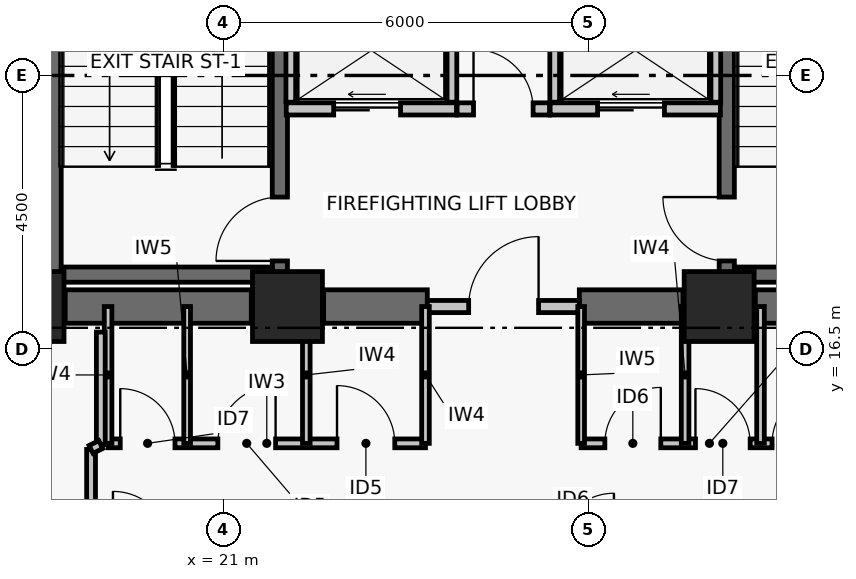
"""IFC4 building model, lengths in metres.
Left out: names, types, materials, properties, quantities, classifications, styles, units other than length and angle.
Written with IfcOpenShell. Run it as: python <this file> out.ifc"""

import sys

from ifc_helpers import new_model, si_unit, direction, frame, frame_2d, origin, origin_2d, place, context, subcontext, project, spatial, rectangle, extrude, element, fill, save


model = new_model("IFC4")
c1 = context("Model", 3, precision=1e-05, world=origin(), true_north=direction((0.0, 1.0)))
c2 = subcontext(c1, "Body", "Model", "MODEL_VIEW")
j1 = project(units=[si_unit("LENGTHUNIT", "METRE"), si_unit("PLANEANGLEUNIT", "RADIAN")], contexts=[c1])
p1 = place(None, origin())
s1 = spatial("IfcSite", under=j1, at=p1, CompositionType="ELEMENT")
p2 = place(p1, origin())
s2 = spatial("IfcBuilding", under=s1, at=p2, CompositionType="ELEMENT")
p3 = place(p2, frame((0.0, 0.0, 118.86)))
s3 = spatial("IfcBuildingStorey", under=s2, at=p3, CompositionType="ELEMENT", Elevation=118.86)
for number, where, z_axis, x_axis in (
    (1, (17.8, 17.2, 0.0), (0.0, 0.0, 1.0), (1.0, 0.0, 0.0)),
    (2, (22.05, 17.2, 0.0), (0.0, 0.0, 1.0), (1.0, 0.0, 0.0)),
    (3, (29.15, 17.2, 0.0), (0.0, 0.0, 1.0), (1.0, 0.0, 0.0)),
):
    element("IfcColumn", number, at=place(p3, frame(where, z_axis=z_axis, x_axis=x_axis)), inside=s3, PredefinedType="COLUMN", context=c2, shape_type="SweptSolid", body=[
        extrude(rectangle(XDim=1.15, YDim=1.15, at=origin_2d()), origin(), (0.0, 0.0, 1.0), 3.72),
    ])
p4 = place(p3, frame((18.395, 17.2, 0.0), z_axis=(0.0, 0.0, 1.0), x_axis=(1.0, 0.0, 0.0)))
e4 = element("IfcWall", 4, at=p4, inside=s3, PredefinedType="SHEAR", context=c2, shape_type="SweptSolid", body=[
    extrude(rectangle(XDim=3.06, YDim=0.55, at=frame_2d((1.53, 0.0))), origin(), (0.0, 0.0, 1.0), 3.47),
])
p5 = place(p3, frame((22.645, 17.2, 0.0), z_axis=(0.0, 0.0, 1.0), x_axis=(1.0, 0.0, 0.0)))
e5 = element("IfcWall", 5, at=p5, inside=s3, PredefinedType="SHEAR", context=c2, shape_type="SweptSolid", body=[
    extrude(rectangle(XDim=1.705, YDim=0.55, at=frame_2d((0.853, 0.0))), origin(), (0.0, 0.0, 1.0), 3.47),
])
p6 = place(p3, frame((26.85, 17.2, 0.0), z_axis=(0.0, 0.0, 1.0), x_axis=(1.0, 0.0, 0.0)))
e6 = element("IfcWall", 6, at=p6, inside=s3, PredefinedType="SHEAR", context=c2, shape_type="SweptSolid", body=[
    extrude(rectangle(XDim=1.705, YDim=0.55, at=frame_2d((0.853, 0.0))), origin(), (0.0, 0.0, 1.0), 3.47),
])
p7 = place(p3, frame((29.745, 17.2, 0.0), z_axis=(0.0, 0.0, 1.0), x_axis=(1.0, 0.0, 0.0)))
e7 = element("IfcWall", 7, at=p7, inside=s3, PredefinedType="SHEAR", context=c2, shape_type="SweptSolid", body=[
    extrude(rectangle(XDim=3.06, YDim=0.55, at=frame_2d((1.53, 0.0))), origin(), (0.0, 0.0, 1.0), 3.47),
])
p8 = place(p3, frame((18.204, 17.6, 0.0), z_axis=(0.0, 0.0, 1.0), x_axis=(0.0, 1.0, 0.0)))
e8 = element("IfcWall", 8, at=p8, inside=s3, PredefinedType="SHEAR", context=c2, shape_type="SweptSolid", body=[
    extrude(rectangle(XDim=8.8, YDim=0.25, at=frame_2d((4.4, 0.0))), origin(), (0.0, 0.0, 1.0), 3.47),
])
p9 = place(p3, frame((21.925, 17.6, 0.0), z_axis=(0.0, 0.0, 1.0), x_axis=(0.0, 1.0, 0.0)))
e9 = element("IfcWall", 9, at=p9, inside=s3, PredefinedType="SHEAR", context=c2, shape_type="SweptSolid", body=[
    extrude(rectangle(XDim=8.8, YDim=0.25, at=frame_2d((4.4, 0.0))), origin(), (0.0, 0.0, 1.0), 3.47),
])
p10 = place(p9, frame((0.35, 0.0, 0.0)))
e10 = element("IfcOpeningElement", 10, at=p10, cuts=e9, PredefinedType="OPENING", context=c2, shape_type="SweptSolid", body=[
    extrude(rectangle(XDim=1.05, YDim=2.08, at=frame_2d((0.525, 1.04))), frame((0.0, 0.135, 0.0), z_axis=(0.0, -1.0, 0.0), x_axis=(1.0, 0.0, 0.0)), (0.0, 0.0, 1.0), 0.27),
])
p11 = place(p3, frame((18.329, 17.725, 0.0), z_axis=(0.0, 0.0, 1.0), x_axis=(1.0, 0.0, 0.0)))
e11 = element("IfcWall", 11, at=p11, inside=s3, PredefinedType="SHEAR", context=c2, shape_type="SweptSolid", body=[
    extrude(rectangle(XDim=3.471, YDim=0.25, at=frame_2d((1.735, 0.0))), origin(), (0.0, 0.0, 1.0), 3.47),
])
p12 = place(p3, frame((29.275, 17.6, 0.0), z_axis=(0.0, 0.0, 1.0), x_axis=(0.0, 1.0, 0.0)))
e12 = element("IfcWall", 12, at=p12, inside=s3, PredefinedType="SHEAR", context=c2, shape_type="SweptSolid", body=[
    extrude(rectangle(XDim=8.8, YDim=0.25, at=frame_2d((4.4, 0.0))), origin(), (0.0, 0.0, 1.0), 3.47),
])
p13 = place(p12, frame((0.35, 0.0, 0.0)))
e13 = element("IfcOpeningElement", 13, at=p13, cuts=e12, PredefinedType="OPENING", context=c2, shape_type="SweptSolid", body=[
    extrude(rectangle(XDim=1.05, YDim=2.08, at=frame_2d((0.525, 1.04))), frame((0.0, 0.135, 0.0), z_axis=(0.0, -1.0, 0.0), x_axis=(1.0, 0.0, 0.0)), (0.0, 0.0, 1.0), 0.27),
])
p14 = place(p3, frame((29.4, 17.725, 0.0), z_axis=(0.0, 0.0, 1.0), x_axis=(1.0, 0.0, 0.0)))
e14 = element("IfcWall", 14, at=p14, inside=s3, PredefinedType="SHEAR", context=c2, shape_type="SweptSolid", body=[
    extrude(rectangle(XDim=3.471, YDim=0.25, at=frame_2d((1.736, 0.0))), origin(), (0.0, 0.0, 1.0), 3.47),
])
p15 = place(p3, frame((35.48, 15.455, 0.0), z_axis=(0.0, 0.0, 1.0), x_axis=(-0.854673977685, -0.51916509115, 0.0)))
e15 = element("IfcWall", 15, at=p15, inside=s3, PredefinedType="PARTITIONING", context=c2, shape_type="SweptSolid", body=[
    extrude(rectangle(XDim=6.678, YDim=0.26, at=frame_2d((3.339, 0.0))), origin(), (0.0, 0.0, 1.0), 3.47),
])
p16 = place(p3, frame((24.35, 17.2, 0.0), z_axis=(0.0, 0.0, 1.0), x_axis=(1.0, 0.0, 0.0)))
e16 = element("IfcWall", 16, at=p16, inside=s3, PredefinedType="PARTITIONING", context=c2, shape_type="SweptSolid", body=[
    extrude(rectangle(XDim=2.5, YDim=0.2, at=frame_2d((1.25, 0.0))), origin(), (0.0, 0.0, 1.0), 2.6),
])
p17 = place(p16, frame((0.68, 0.0, 0.0)))
e17 = element("IfcOpeningElement", 17, at=p17, cuts=e16, PredefinedType="OPENING", context=c2, shape_type="SweptSolid", body=[
    extrude(rectangle(XDim=1.15, YDim=2.08, at=frame_2d((0.575, 1.04))), frame((0.0, 0.11, 0.0), z_axis=(0.0, -1.0, 0.0), x_axis=(1.0, 0.0, 0.0)), (0.0, 0.0, 1.0), 0.22),
])
p18 = place(p3, frame((24.84, 20.45, 0.0), z_axis=(0.0, 0.0, 1.0), x_axis=(1.0, 0.0, 0.0)))
e18 = element("IfcWall", 18, at=p18, inside=s3, PredefinedType="PARTITIONING", context=c2, shape_type="SweptSolid", body=[
    extrude(rectangle(XDim=1.52, YDim=0.2, at=frame_2d((0.76, 0.0))), origin(), (0.0, 0.0, 1.0), 3.47),
])
p19 = place(p18, frame((0.27, 0.0, 0.0)))
e19 = element("IfcOpeningElement", 19, at=p19, cuts=e18, PredefinedType="OPENING", context=c2, shape_type="SweptSolid", body=[
    extrude(rectangle(XDim=0.98, YDim=2.06, at=frame_2d((0.49, 1.03))), frame((0.0, 0.11, 0.0), z_axis=(0.0, -1.0, 0.0), x_axis=(1.0, 0.0, 0.0)), (0.0, 0.0, 1.0), 0.22),
])
p20 = place(p3, frame((22.03, 20.45, 0.0), z_axis=(0.0, 0.0, 1.0), x_axis=(1.0, 0.0, 0.0)))
e20 = element("IfcWall", 20, at=p20, inside=s3, PredefinedType="PARTITIONING", context=c2, shape_type="SweptSolid", body=[
    extrude(rectangle(XDim=2.8, YDim=0.2, at=frame_2d((1.4, 0.0))), origin(), (0.0, 0.0, 1.0), 3.47),
])
p21 = place(p20, frame((0.78, 0.0, 0.0)))
e21 = element("IfcOpeningElement", 21, at=p21, cuts=e20, PredefinedType="OPENING", context=c2, shape_type="SweptSolid", body=[
    extrude(rectangle(XDim=1.1, YDim=2.08, at=frame_2d((0.55, 1.04))), frame((0.0, 0.11, 0.0), z_axis=(0.0, -1.0, 0.0), x_axis=(1.0, 0.0, 0.0)), (0.0, 0.0, 1.0), 0.22),
])
p22 = place(p3, frame((26.37, 20.45, 0.0), z_axis=(0.0, 0.0, 1.0), x_axis=(1.0, 0.0, 0.0)))
e22 = element("IfcWall", 22, at=p22, inside=s3, PredefinedType="PARTITIONING", context=c2, shape_type="SweptSolid", body=[
    extrude(rectangle(XDim=2.8, YDim=0.2, at=frame_2d((1.4, 0.0))), origin(), (0.0, 0.0, 1.0), 3.47),
])
p23 = place(p22, frame((0.78, 0.0, 0.0)))
e23 = element("IfcOpeningElement", 23, at=p23, cuts=e22, PredefinedType="OPENING", context=c2, shape_type="SweptSolid", body=[
    extrude(rectangle(XDim=1.1, YDim=2.08, at=frame_2d((0.55, 1.04))), frame((0.0, 0.11, 0.0), z_axis=(0.0, -1.0, 0.0), x_axis=(1.0, 0.0, 0.0)), (0.0, 0.0, 1.0), 0.22),
])
for number, where, z_axis, x_axis in (
    (24, (22.105, 20.56, 0.0), (0.0, 0.0, 1.0), (0.0, 1.0, 0.0)),
    (25, (24.755, 20.56, 0.0), (0.0, 0.0, 1.0), (0.0, 1.0, 0.0)),
):
    element("IfcWall", number, at=place(p3, frame(where, z_axis=z_axis, x_axis=x_axis)), inside=s3, PredefinedType="PARTITIONING", context=c2, shape_type="SweptSolid", body=[
        extrude(rectangle(XDim=1.71, YDim=0.16, at=frame_2d((0.855, 0.0))), origin(), (0.0, 0.0, 1.0), 3.47),
    ])
p24 = place(p3, frame((29.095, 20.56, 0.0), z_axis=(0.0, 0.0, 1.0), x_axis=(0.0, 1.0, 0.0)))
e26 = element("IfcWall", 26, at=p24, inside=s3, PredefinedType="PARTITIONING", context=c2, shape_type="SweptSolid", body=[
    extrude(rectangle(XDim=5.45, YDim=0.16, at=frame_2d((2.725, 0.0))), origin(), (0.0, 0.0, 1.0), 3.47),
])
p25 = place(p3, frame((26.445, 20.56, 0.0), z_axis=(0.0, 0.0, 1.0), x_axis=(0.0, 1.0, 0.0)))
e27 = element("IfcWall", 27, at=p25, inside=s3, PredefinedType="PARTITIONING", context=c2, shape_type="SweptSolid", body=[
    extrude(rectangle(XDim=1.71, YDim=0.16, at=frame_2d((0.855, 0.0))), origin(), (0.0, 0.0, 1.0), 3.47),
])
p26 = place(p3, frame((19.1, 14.95, 0.0), z_axis=(0.0, 0.0, 1.0), x_axis=(1.0, 0.0, 0.0)))
e28 = element("IfcWall", 28, at=p26, inside=s3, PredefinedType="PARTITIONING", context=c2, shape_type="SweptSolid", body=[
    extrude(rectangle(XDim=5.22, YDim=0.145, at=frame_2d((2.61, 0.0))), origin(), (0.0, 0.0, 1.0), 2.65),
])
p27 = place(p26, frame((0.2, 0.0, 0.0)))
e29 = element("IfcOpeningElement", 29, at=p27, cuts=e28, PredefinedType="OPENING", context=c2, shape_type="SweptSolid", body=[
    extrude(rectangle(XDim=0.9, YDim=2.02, at=frame_2d((0.45, 1.01))), frame((0.0, 0.083, 0.0), z_axis=(0.0, -1.0, 0.0), x_axis=(1.0, 0.0, 0.0)), (0.0, 0.0, 1.0), 0.165),
])
p28 = place(p26, frame((1.805, 0.0, 0.0)))
e30 = element("IfcOpeningElement", 30, at=p28, cuts=e28, PredefinedType="OPENING", context=c2, shape_type="SweptSolid", body=[
    extrude(rectangle(XDim=0.95, YDim=2.06, at=frame_2d((0.475, 1.03))), frame((0.0, 0.083, 0.0), z_axis=(0.0, -1.0, 0.0), x_axis=(1.0, 0.0, 0.0)), (0.0, 0.0, 1.0), 0.165),
])
p29 = place(p26, frame((3.765, 0.0, 0.0)))
e31 = element("IfcOpeningElement", 31, at=p29, cuts=e28, PredefinedType="OPENING", context=c2, shape_type="SweptSolid", body=[
    extrude(rectangle(XDim=0.95, YDim=2.06, at=frame_2d((0.475, 1.03))), frame((0.0, 0.083, 0.0), z_axis=(0.0, -1.0, 0.0), x_axis=(1.0, 0.0, 0.0)), (0.0, 0.0, 1.0), 0.165),
])
p30 = place(p3, frame((26.88, 14.95, 0.0), z_axis=(0.0, 0.0, 1.0), x_axis=(1.0, 0.0, 0.0)))
e32 = element("IfcWall", 32, at=p30, inside=s3, PredefinedType="PARTITIONING", context=c2, shape_type="SweptSolid", body=[
    extrude(rectangle(XDim=4.22, YDim=0.145, at=frame_2d((2.11, 0.0))), origin(), (0.0, 0.0, 1.0), 3.05),
])
p31 = place(p30, frame((0.39, 0.0, 0.0)))
e33 = element("IfcOpeningElement", 33, at=p31, cuts=e32, PredefinedType="OPENING", context=c2, shape_type="SweptSolid", body=[
    extrude(rectangle(XDim=0.92, YDim=2.05, at=frame_2d((0.46, 1.025))), frame((0.0, 0.083, 0.0), z_axis=(0.0, -1.0, 0.0), x_axis=(1.0, 0.0, 0.0)), (0.0, 0.0, 1.0), 0.165),
])
p32 = place(p30, frame((1.88, 0.0, 0.0)))
e34 = element("IfcOpeningElement", 34, at=p32, cuts=e32, PredefinedType="OPENING", context=c2, shape_type="SweptSolid", body=[
    extrude(rectangle(XDim=0.9, YDim=2.02, at=frame_2d((0.45, 1.01))), frame((0.0, 0.083, 0.0), z_axis=(0.0, -1.0, 0.0), x_axis=(1.0, 0.0, 0.0)), (0.0, 0.0, 1.0), 0.165),
])
p33 = place(p30, frame((3.14, 0.0, 0.0)))
e35 = element("IfcOpeningElement", 35, at=p33, cuts=e32, PredefinedType="OPENING", context=c2, shape_type="SweptSolid", body=[
    extrude(rectangle(XDim=0.9, YDim=2.02, at=frame_2d((0.45, 1.01))), frame((0.0, 0.083, 0.0), z_axis=(0.0, -1.0, 0.0), x_axis=(1.0, 0.0, 0.0)), (0.0, 0.0, 1.0), 0.165),
])
p34 = place(p3, frame((19.1, 14.95, 0.0), z_axis=(0.0, 0.0, 1.0), x_axis=(0.0, 1.0, 0.0)))
e36 = element("IfcWall", 36, at=p34, inside=s3, PredefinedType="PARTITIONING", context=c2, shape_type="SweptSolid", body=[
    extrude(rectangle(XDim=2.25, YDim=0.125, at=frame_2d((1.125, 0.0))), origin(), (0.0, 0.0, 1.0), 2.6),
])
p35 = place(p3, frame((20.4, 14.95, 0.0), z_axis=(0.0, 0.0, 1.0), x_axis=(0.0, 1.0, 0.0)))
e37 = element("IfcWall", 37, at=p35, inside=s3, PredefinedType="PARTITIONING", context=c2, shape_type="SweptSolid", body=[
    extrude(rectangle(XDim=2.25, YDim=0.11, at=frame_2d((1.125, 0.0))), origin(), (0.0, 0.0, 1.0), 2.6),
])
for number, where, z_axis, x_axis in (
    (38, (22.36, 14.95, 0.0), (0.0, 0.0, 1.0), (0.0, 1.0, 0.0)),
    (39, (24.32, 14.95, 0.0), (0.0, 0.0, 1.0), (0.0, 1.0, 0.0)),
):
    element("IfcWall", number, at=place(p3, frame(where, z_axis=z_axis, x_axis=x_axis)), inside=s3, PredefinedType="PARTITIONING", context=c2, shape_type="SweptSolid", body=[
        extrude(rectangle(XDim=2.25, YDim=0.125, at=frame_2d((1.125, 0.0))), origin(), (0.0, 0.0, 1.0), 2.6),
    ])
p36 = place(p3, frame((26.88, 14.95, 0.0), z_axis=(0.0, 0.0, 1.0), x_axis=(0.0, 1.0, 0.0)))
e40 = element("IfcWall", 40, at=p36, inside=s3, PredefinedType="PARTITIONING", context=c2, shape_type="SweptSolid", body=[
    extrude(rectangle(XDim=2.25, YDim=0.11, at=frame_2d((1.125, 0.0))), origin(), (0.0, 0.0, 1.0), 2.6),
])
for number, where, z_axis, x_axis in (
    (41, (28.59, 14.95, 0.0), (0.0, 0.0, 1.0), (0.0, 1.0, 0.0)),
    (42, (29.83, 14.95, 0.0), (0.0, 0.0, 1.0), (0.0, 1.0, 0.0)),
):
    element("IfcWall", number, at=place(p3, frame(where, z_axis=z_axis, x_axis=x_axis)), inside=s3, PredefinedType="PARTITIONING", context=c2, shape_type="SweptSolid", body=[
        extrude(rectangle(XDim=2.25, YDim=0.125, at=frame_2d((1.125, 0.0))), origin(), (0.0, 0.0, 1.0), 2.6),
    ])
p37 = place(p3, frame((18.98, 16.78, 0.0), z_axis=(0.0, 0.0, 1.0), x_axis=(0.0, -1.0, 0.0)))
e43 = element("IfcWall", 43, at=p37, inside=s3, PredefinedType="PARTITIONING", context=c2, shape_type="SweptSolid", body=[
    extrude(rectangle(XDim=1.85, YDim=0.145, at=frame_2d((0.925, 0.0))), origin(), (0.0, 0.0, 1.0), 2.6),
])
p38 = place(p3, frame((18.82, 14.85, 0.0), z_axis=(0.0, 0.0, 1.0), x_axis=(0.0, -1.0, 0.0)))
e44 = element("IfcWall", 44, at=p38, inside=s3, PredefinedType="PARTITIONING", context=c2, shape_type="SweptSolid", body=[
    extrude(rectangle(XDim=1.56, YDim=0.145, at=frame_2d((0.78, 0.0))), origin(), (0.0, 0.0, 1.0), 3.05),
])
p39 = place(p3, frame((18.82, 14.85, 0.0), z_axis=(0.0, 0.0, 1.0), x_axis=(0.89470021502, 0.446667130247, 0.0)))
e45 = element("IfcWall", 45, at=p39, inside=s3, PredefinedType="PARTITIONING", context=c2, shape_type="SweptSolid", body=[
    extrude(rectangle(XDim=0.179, YDim=0.145, at=frame_2d((0.089, 0.0))), origin(), (0.0, 0.0, 1.0), 3.47),
])
p40 = place(p10, origin())
e46 = element("IfcDoor", 46, at=p40, inside=s3, OperationType="SINGLE_SWING_LEFT", PredefinedType="DOOR", context=c2, shape_type="SweptSolid", body=[
    extrude(rectangle(XDim=1.05, YDim=2.08, at=frame_2d((0.525, 1.04))), frame((0.0, 0.025, 0.0), z_axis=(0.0, -1.0, 0.0), x_axis=(1.0, 0.0, 0.0)), (0.0, 0.0, 1.0), 0.05),
])
fill(e10, e46)
p41 = place(p13, origin())
e47 = element("IfcDoor", 47, at=p41, inside=s3, OperationType="SINGLE_SWING_RIGHT", PredefinedType="DOOR", context=c2, shape_type="SweptSolid", body=[
    extrude(rectangle(XDim=1.05, YDim=2.08, at=frame_2d((0.525, 1.04))), frame((0.0, 0.025, 0.0), z_axis=(0.0, -1.0, 0.0), x_axis=(1.0, 0.0, 0.0)), (0.0, 0.0, 1.0), 0.05),
])
fill(e13, e47)
p42 = place(p17, origin())
e48 = element("IfcDoor", 48, at=p42, inside=s3, OperationType="SINGLE_SWING_RIGHT", PredefinedType="DOOR", context=c2, shape_type="SweptSolid", body=[
    extrude(rectangle(XDim=1.15, YDim=2.08, at=frame_2d((0.575, 1.04))), frame((0.0, 0.025, 0.0), z_axis=(0.0, -1.0, 0.0), x_axis=(1.0, 0.0, 0.0)), (0.0, 0.0, 1.0), 0.05),
])
fill(e17, e48)
p43 = place(p19, origin())
e49 = element("IfcDoor", 49, at=p43, inside=s3, OperationType="SINGLE_SWING_LEFT", PredefinedType="DOOR", context=c2, shape_type="SweptSolid", body=[
    extrude(rectangle(XDim=0.98, YDim=2.06, at=frame_2d((0.49, 1.03))), frame((0.0, 0.025, 0.0), z_axis=(0.0, -1.0, 0.0), x_axis=(1.0, 0.0, 0.0)), (0.0, 0.0, 1.0), 0.05),
])
fill(e19, e49)
p44 = place(p21, origin())
e50 = element("IfcDoor", 50, at=p44, inside=s3, OperationType="DOUBLE_DOOR_SLIDING", PredefinedType="DOOR", context=c2, shape_type="SweptSolid", body=[
    extrude(rectangle(XDim=1.1, YDim=2.08, at=frame_2d((0.55, 1.04))), frame((0.0, 0.025, 0.0), z_axis=(0.0, -1.0, 0.0), x_axis=(1.0, 0.0, 0.0)), (0.0, 0.0, 1.0), 0.05),
])
fill(e21, e50)
p45 = place(p23, origin())
e51 = element("IfcDoor", 51, at=p45, inside=s3, OperationType="DOUBLE_DOOR_SLIDING", PredefinedType="DOOR", context=c2, shape_type="SweptSolid", body=[
    extrude(rectangle(XDim=1.1, YDim=2.08, at=frame_2d((0.55, 1.04))), frame((0.0, 0.025, 0.0), z_axis=(0.0, -1.0, 0.0), x_axis=(1.0, 0.0, 0.0)), (0.0, 0.0, 1.0), 0.05),
])
fill(e23, e51)
p46 = place(p27, origin())
e52 = element("IfcDoor", 52, at=p46, inside=s3, OperationType="SINGLE_SWING_LEFT", PredefinedType="DOOR", context=c2, shape_type="SweptSolid", body=[
    extrude(rectangle(XDim=0.9, YDim=2.02, at=frame_2d((0.45, 1.01))), frame((0.0, 0.025, 0.0), z_axis=(0.0, -1.0, 0.0), x_axis=(1.0, 0.0, 0.0)), (0.0, 0.0, 1.0), 0.05),
])
fill(e29, e52)
p47 = place(p28, origin())
e53 = element("IfcDoor", 53, at=p47, inside=s3, OperationType="SINGLE_SWING_RIGHT", PredefinedType="DOOR", context=c2, shape_type="SweptSolid", body=[
    extrude(rectangle(XDim=0.95, YDim=2.06, at=frame_2d((0.475, 1.03))), frame((0.0, 0.025, 0.0), z_axis=(0.0, -1.0, 0.0), x_axis=(1.0, 0.0, 0.0)), (0.0, 0.0, 1.0), 0.05),
])
fill(e30, e53)
p48 = place(p29, origin())
e54 = element("IfcDoor", 54, at=p48, inside=s3, OperationType="SINGLE_SWING_LEFT", PredefinedType="DOOR", context=c2, shape_type="SweptSolid", body=[
    extrude(rectangle(XDim=0.95, YDim=2.06, at=frame_2d((0.475, 1.03))), frame((0.0, 0.025, 0.0), z_axis=(0.0, -1.0, 0.0), x_axis=(1.0, 0.0, 0.0)), (0.0, 0.0, 1.0), 0.05),
])
fill(e31, e54)
p49 = place(p31, origin())
e55 = element("IfcDoor", 55, at=p49, inside=s3, OperationType="SINGLE_SWING_RIGHT", PredefinedType="DOOR", context=c2, shape_type="SweptSolid", body=[
    extrude(rectangle(XDim=0.92, YDim=2.05, at=frame_2d((0.46, 1.025))), frame((0.0, 0.025, 0.0), z_axis=(0.0, -1.0, 0.0), x_axis=(1.0, 0.0, 0.0)), (0.0, 0.0, 1.0), 0.05),
])
fill(e33, e55)
p50 = place(p32, origin())
e56 = element("IfcDoor", 56, at=p50, inside=s3, OperationType="SINGLE_SWING_LEFT", PredefinedType="DOOR", context=c2, shape_type="SweptSolid", body=[
    extrude(rectangle(XDim=0.9, YDim=2.02, at=frame_2d((0.45, 1.01))), frame((0.0, 0.025, 0.0), z_axis=(0.0, -1.0, 0.0), x_axis=(1.0, 0.0, 0.0)), (0.0, 0.0, 1.0), 0.05),
])
fill(e34, e56)
p51 = place(p33, origin())
e57 = element("IfcDoor", 57, at=p51, inside=s3, OperationType="SINGLE_SWING_RIGHT", PredefinedType="DOOR", context=c2, shape_type="SweptSolid", body=[
    extrude(rectangle(XDim=0.9, YDim=2.02, at=frame_2d((0.45, 1.01))), frame((0.0, 0.025, 0.0), z_axis=(0.0, -1.0, 0.0), x_axis=(1.0, 0.0, 0.0)), (0.0, 0.0, 1.0), 0.05),
])
fill(e35, e57)
save(model, sys.argv[1])
